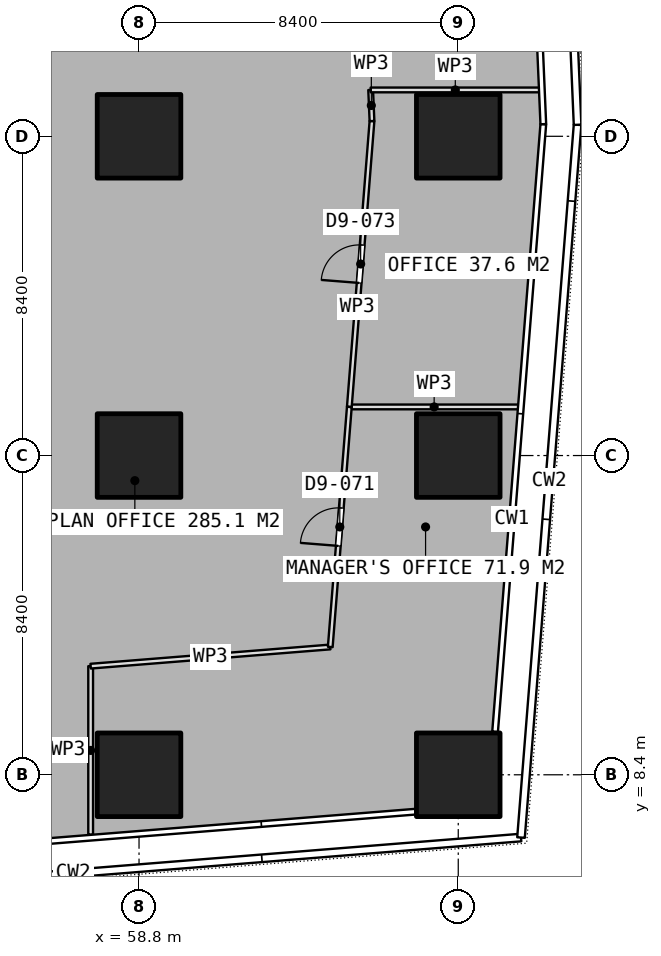
"""IFC4 building model, lengths in metres.
Left out: names, types, materials, properties, quantities, classifications, styles, units other than length and angle.
Written with IfcOpenShell. Run it as: python <this file> out.ifc"""

import sys

from ifc_helpers import new_model, si_unit, direction, frame, frame_2d, origin, origin_2d, place, context, subcontext, project, spatial, rectangle, extrude, element, fill, save


model = new_model("IFC4")
c1 = context("Model", 3, precision=1e-05, world=origin(), true_north=direction((0.0, 1.0)))
c2 = subcontext(c1, "Body", "Model", "MODEL_VIEW")
j1 = project(units=[si_unit("LENGTHUNIT", "METRE"), si_unit("PLANEANGLEUNIT", "RADIAN")], contexts=[c1])
p1 = place(None, origin())
s1 = spatial("IfcSite", under=j1, at=p1, CompositionType="ELEMENT")
p2 = place(p1, origin())
s2 = spatial("IfcBuilding", under=s1, at=p2, CompositionType="ELEMENT")
p3 = place(p2, frame((0.0, 0.0, 36.65)))
s3 = spatial("IfcBuildingStorey", under=s2, at=p3, CompositionType="ELEMENT", Elevation=36.65)
for number, where, z_axis, x_axis in (
    (1, (58.8, 8.4, 0.0), (0.0, 0.0, 1.0), (1.0, 0.0, 0.0)),
    (2, (58.8, 16.8, 0.0), (0.0, 0.0, 1.0), (1.0, 0.0, 0.0)),
    (3, (58.8, 25.2, 0.0), (0.0, 0.0, 1.0), (1.0, 0.0, 0.0)),
    (4, (67.2, 8.4, 0.0), (0.0, 0.0, 1.0), (1.0, 0.0, 0.0)),
    (5, (67.2, 16.8, 0.0), (0.0, 0.0, 1.0), (1.0, 0.0, 0.0)),
    (6, (67.2, 25.2, 0.0), (0.0, 0.0, 1.0), (1.0, 0.0, 0.0)),
):
    element("IfcColumn", number, at=place(p3, frame(where, z_axis=z_axis, x_axis=x_axis)), inside=s3, PredefinedType="COLUMN", context=c2, shape_type="SweptSolid", body=[
        extrude(rectangle(XDim=2.2, YDim=2.2, at=origin_2d()), origin(), (0.0, 0.0, 1.0), 3.75),
    ])
p4 = place(p3, frame((57.527, 6.824, 0.0), z_axis=(0.0, 0.0, 1.0), x_axis=(0.0, 1.0, 0.0)))
e7 = element("IfcWall", 7, at=p4, inside=s3, PredefinedType="PARTITIONING", context=c2, shape_type="SweptSolid", body=[
    extrude(rectangle(XDim=4.434, YDim=0.125, at=frame_2d((2.217, 0.0))), origin(), (0.0, 0.0, 1.0), 3.5),
])
p5 = place(p3, frame((57.527, 11.258, 0.0), z_axis=(0.0, 0.0, 1.0), x_axis=(0.996809139081, 0.079821928349, 0.0)))
e8 = element("IfcWall", 8, at=p5, inside=s3, PredefinedType="PARTITIONING", context=c2, shape_type="SweptSolid", body=[
    extrude(rectangle(XDim=6.325, YDim=0.125, at=frame_2d((3.163, 0.0))), origin(), (0.0, 0.0, 1.0), 3.5),
])
p6 = place(p3, frame((63.832, 11.763, 0.0), z_axis=(0.0, 0.0, 1.0), x_axis=(0.07922144789, 0.996857042005, 0.0)))
e9 = element("IfcWall", 9, at=p6, inside=s3, PredefinedType="PARTITIONING", context=c2, shape_type="SweptSolid", body=[
    extrude(rectangle(XDim=6.336, YDim=0.125, at=frame_2d((3.168, 0.0))), origin(), (0.0, 0.0, 1.0), 3.5),
])
p7 = place(p6, frame((2.668, 0.0, 0.0)))
e10 = element("IfcOpeningElement", 10, at=p7, cuts=e9, PredefinedType="OPENING", context=c2, shape_type="SweptSolid", body=[
    extrude(rectangle(XDim=1.0, YDim=2.1, at=frame_2d((0.5, 1.05))), frame((0.0, 0.073, 0.0), z_axis=(0.0, -1.0, 0.0), x_axis=(1.0, 0.0, 0.0)), (0.0, 0.0, 1.0), 0.145),
])
p8 = place(p3, frame((64.334, 18.079, 0.0), z_axis=(0.0, 0.0, 1.0), x_axis=(1.0, 0.0, 0.0)))
e11 = element("IfcWall", 11, at=p8, inside=s3, PredefinedType="PARTITIONING", context=c2, shape_type="SweptSolid", body=[
    extrude(rectangle(XDim=4.464, YDim=0.125, at=frame_2d((2.232, 0.0))), origin(), (0.0, 0.0, 1.0), 3.5),
])
p9 = place(p3, frame((64.334, 18.08, 0.0), z_axis=(0.0, 0.0, 1.0), x_axis=(0.078990223615, 0.996875390695, 0.0)))
e12 = element("IfcWall", 12, at=p9, inside=s3, PredefinedType="PARTITIONING", context=c2, shape_type="SweptSolid", body=[
    extrude(rectangle(XDim=7.545, YDim=0.125, at=frame_2d((3.772, 0.0))), origin(), (0.0, 0.0, 1.0), 3.5),
])
p10 = place(p9, frame((3.272, 0.0, 0.0)))
e13 = element("IfcOpeningElement", 13, at=p10, cuts=e12, PredefinedType="OPENING", context=c2, shape_type="SweptSolid", body=[
    extrude(rectangle(XDim=1.0, YDim=2.1, at=frame_2d((0.5, 1.05))), frame((0.0, 0.073, 0.0), z_axis=(0.0, -1.0, 0.0), x_axis=(1.0, 0.0, 0.0)), (0.0, 0.0, 1.0), 0.145),
])
p11 = place(p3, frame((64.93, 25.601, 0.0), z_axis=(0.0, 0.0, 1.0), x_axis=(-0.042596960129, 0.999092337568, 0.0)))
e14 = element("IfcWall", 14, at=p11, inside=s3, PredefinedType="PARTITIONING", context=c2, shape_type="SweptSolid", body=[
    extrude(rectangle(XDim=0.82, YDim=0.125, at=frame_2d((0.41, 0.0))), origin(), (0.0, 0.0, 1.0), 3.5),
])
p12 = place(p3, frame((64.895, 26.42, 0.0), z_axis=(0.0, 0.0, 1.0), x_axis=(1.0, 0.0, 0.0)))
e15 = element("IfcWall", 15, at=p12, inside=s3, PredefinedType="PARTITIONING", context=c2, shape_type="SweptSolid", body=[
    extrude(rectangle(XDim=4.455, YDim=0.125, at=frame_2d((2.228, 0.0))), origin(), (0.0, 0.0, 1.0), 3.5),
])
p13 = place(p7, origin())
e16 = element("IfcDoor", 16, at=p13, inside=s3, OperationType="SINGLE_SWING_LEFT", PredefinedType="DOOR", context=c2, shape_type="SweptSolid", body=[
    extrude(rectangle(XDim=1.0, YDim=2.1, at=frame_2d((0.5, 1.05))), frame((0.0, 0.025, 0.0), z_axis=(0.0, -1.0, 0.0), x_axis=(1.0, 0.0, 0.0)), (0.0, 0.0, 1.0), 0.05),
])
fill(e10, e16)
p14 = place(p10, origin())
e17 = element("IfcDoor", 17, at=p14, inside=s3, OperationType="SINGLE_SWING_LEFT", PredefinedType="DOOR", context=c2, shape_type="SweptSolid", body=[
    extrude(rectangle(XDim=1.0, YDim=2.1, at=frame_2d((0.5, 1.05))), frame((0.0, 0.025, 0.0), z_axis=(0.0, -1.0, 0.0), x_axis=(1.0, 0.0, 0.0)), (0.0, 0.0, 1.0), 0.05),
])
fill(e13, e17)
save(model, sys.argv[1])
